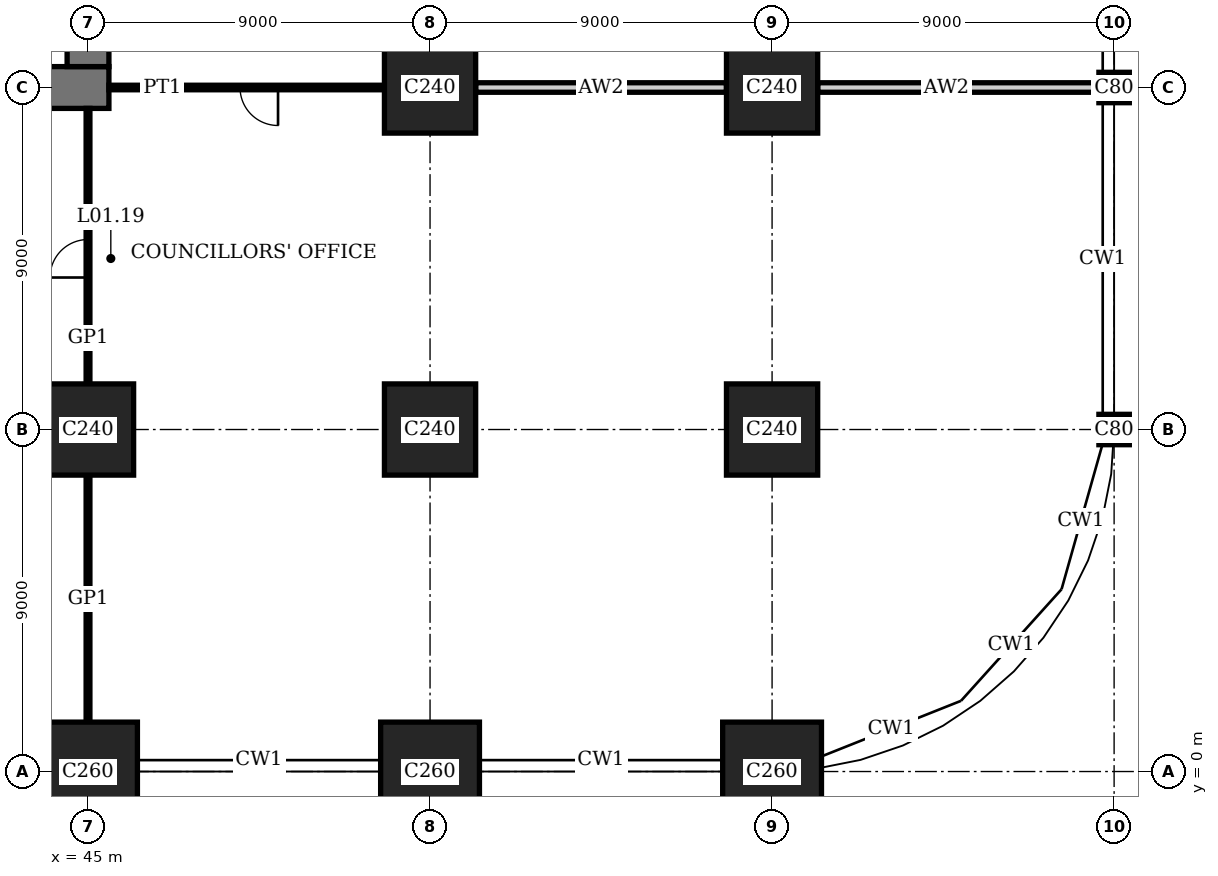
"""IFC4 building model, lengths in metres.
Left out: names, types, materials, properties, quantities, classifications, styles, units other than length and angle.
Written with IfcOpenShell. Run it as: python <this file> out.ifc"""

import sys

from ifc_helpers import new_model, si_unit, direction, frame, frame_2d, origin, origin_2d, place, context, subcontext, project, spatial, rectangle, extrude, element, fill, save


model = new_model("IFC4")
c1 = context("Model", 3, precision=1e-05, world=origin(), true_north=direction((0.0, 1.0)))
c2 = subcontext(c1, "Body", "Model", "MODEL_VIEW")
j1 = project(units=[si_unit("LENGTHUNIT", "METRE"), si_unit("PLANEANGLEUNIT", "RADIAN")], contexts=[c1])
p1 = place(None, origin())
s1 = spatial("IfcSite", under=j1, at=p1, CompositionType="ELEMENT")
p2 = place(p1, origin())
s2 = spatial("IfcBuilding", under=s1, at=p2, CompositionType="ELEMENT")
p3 = place(p2, frame((0.0, 0.0, 5.4)))
s3 = spatial("IfcBuildingStorey", under=s2, at=p3, CompositionType="ELEMENT", Elevation=5.4)
p4 = place(p3, frame((45.0, 0.0, 0.0), z_axis=(0.0, 0.0, 1.0), x_axis=(1.0, 0.0, 0.0)))
e1 = element("IfcColumn", 1, at=p4, inside=s3, PredefinedType="COLUMN", context=c2, shape_type="SweptSolid", body=[
    extrude(rectangle(XDim=2.6, YDim=2.6, at=origin_2d()), origin(), (0.0, 0.0, 1.0), 5.4),
])
p5 = place(p3, frame((45.0, 9.0, 0.0), z_axis=(0.0, 0.0, 1.0), x_axis=(1.0, 0.0, 0.0)))
e2 = element("IfcColumn", 2, at=p5, inside=s3, PredefinedType="COLUMN", context=c2, shape_type="SweptSolid", body=[
    extrude(rectangle(XDim=2.4, YDim=2.4, at=origin_2d()), origin(), (0.0, 0.0, 1.0), 5.4),
])
p6 = place(p3, frame((54.0, 0.0, 0.0), z_axis=(0.0, 0.0, 1.0), x_axis=(1.0, 0.0, 0.0)))
e3 = element("IfcColumn", 3, at=p6, inside=s3, PredefinedType="COLUMN", context=c2, shape_type="SweptSolid", body=[
    extrude(rectangle(XDim=2.6, YDim=2.6, at=origin_2d()), origin(), (0.0, 0.0, 1.0), 5.4),
])
for number, where, z_axis, x_axis in (
    (4, (54.0, 9.0, 0.0), (0.0, 0.0, 1.0), (1.0, 0.0, 0.0)),
    (5, (54.0, 18.0, 0.0), (0.0, 0.0, 1.0), (1.0, 0.0, 0.0)),
):
    element("IfcColumn", number, at=place(p3, frame(where, z_axis=z_axis, x_axis=x_axis)), inside=s3, PredefinedType="COLUMN", context=c2, shape_type="SweptSolid", body=[
        extrude(rectangle(XDim=2.4, YDim=2.4, at=origin_2d()), origin(), (0.0, 0.0, 1.0), 5.4),
    ])
p7 = place(p3, frame((63.0, 0.0, 0.0), z_axis=(0.0, 0.0, 1.0), x_axis=(1.0, 0.0, 0.0)))
e6 = element("IfcColumn", 6, at=p7, inside=s3, PredefinedType="COLUMN", context=c2, shape_type="SweptSolid", body=[
    extrude(rectangle(XDim=2.6, YDim=2.6, at=origin_2d()), origin(), (0.0, 0.0, 1.0), 5.4),
])
for number, where, z_axis, x_axis in (
    (7, (63.0, 9.0, 0.0), (0.0, 0.0, 1.0), (1.0, 0.0, 0.0)),
    (8, (63.0, 18.0, 0.0), (0.0, 0.0, 1.0), (1.0, 0.0, 0.0)),
):
    element("IfcColumn", number, at=place(p3, frame(where, z_axis=z_axis, x_axis=x_axis)), inside=s3, PredefinedType="COLUMN", context=c2, shape_type="SweptSolid", body=[
        extrude(rectangle(XDim=2.4, YDim=2.4, at=origin_2d()), origin(), (0.0, 0.0, 1.0), 5.4),
    ])
for number, where, z_axis, x_axis in (
    (9, (72.0, 9.0, 0.0), (0.0, 0.0, 1.0), (1.0, 0.0, 0.0)),
    (10, (72.0, 18.0, 0.0), (0.0, 0.0, 1.0), (1.0, 0.0, 0.0)),
):
    element("IfcColumn", number, at=place(p3, frame(where, z_axis=z_axis, x_axis=x_axis)), inside=s3, PredefinedType="COLUMN", context=c2, shape_type="SweptSolid", body=[
        extrude(rectangle(XDim=0.8, YDim=0.8, at=origin_2d()), origin(), (0.0, 0.0, 1.0), 5.4),
    ])
p8 = place(p3, frame((17.45, 18.0, 0.0), z_axis=(0.0, 0.0, 1.0), x_axis=(1.0, 0.0, 0.0)))
e11 = element("IfcWall", 11, at=p8, inside=s3, PredefinedType="SHEAR", context=c2, shape_type="SweptSolid", body=[
    extrude(rectangle(XDim=28.1, YDim=1.1, at=frame_2d((14.05, 0.0))), origin(), (0.0, 0.0, 1.0), 5.4),
])
p9 = place(p8, frame((11.55, 0.0, 0.0)))
e12 = element("IfcOpeningElement", 12, at=p9, cuts=e11, PredefinedType="OPENING", context=c2, shape_type="SweptSolid", body=[
    extrude(rectangle(XDim=1.0, YDim=2.4, at=frame_2d((0.5, 1.2))), frame((0.0, 0.56, 0.0), z_axis=(0.0, -1.0, 0.0), x_axis=(1.0, 0.0, 0.0)), (0.0, 0.0, 1.0), 1.12),
])
p10 = place(p8, frame((16.55, 0.0, 0.0)))
e13 = element("IfcOpeningElement", 13, at=p10, cuts=e11, PredefinedType="OPENING", context=c2, shape_type="SweptSolid", body=[
    extrude(rectangle(XDim=1.0, YDim=2.4, at=frame_2d((0.5, 1.2))), frame((0.0, 0.56, 0.0), z_axis=(0.0, -1.0, 0.0), x_axis=(1.0, 0.0, 0.0)), (0.0, 0.0, 1.0), 1.12),
])
p11 = place(p8, frame((20.0, 0.0, 0.0)))
e14 = element("IfcOpeningElement", 14, at=p11, cuts=e11, PredefinedType="OPENING", context=c2, shape_type="SweptSolid", body=[
    extrude(rectangle(XDim=1.1, YDim=2.4, at=frame_2d((0.55, 1.2))), frame((0.0, 0.56, 0.0), z_axis=(0.0, -1.0, 0.0), x_axis=(1.0, 0.0, 0.0)), (0.0, 0.0, 1.0), 1.12),
])
p12 = place(p8, frame((24.05, 0.0, 0.0)))
e15 = element("IfcOpeningElement", 15, at=p12, cuts=e11, PredefinedType="OPENING", context=c2, shape_type="SweptSolid", body=[
    extrude(rectangle(XDim=1.0, YDim=2.4, at=frame_2d((0.5, 1.2))), frame((0.0, 0.56, 0.0), z_axis=(0.0, -1.0, 0.0), x_axis=(1.0, 0.0, 0.0)), (0.0, 0.0, 1.0), 1.12),
])
p13 = place(p3, frame((45.0, 18.55, 0.0), z_axis=(0.0, 0.0, 1.0), x_axis=(0.0, 1.0, 0.0)))
e16 = element("IfcWall", 16, at=p13, inside=s3, PredefinedType="SHEAR", context=c2, shape_type="SweptSolid", body=[
    extrude(rectangle(XDim=16.9, YDim=1.1, at=frame_2d((8.45, 0.0))), origin(), (0.0, 0.0, 1.0), 5.4),
])
p14 = place(p13, frame((8.45, 0.0, 0.0)))
e17 = element("IfcOpeningElement", 17, at=p14, cuts=e16, PredefinedType="OPENING", context=c2, shape_type="SweptSolid", body=[
    extrude(rectangle(XDim=1.8, YDim=2.4, at=frame_2d((0.9, 1.2))), frame((0.0, 0.56, 0.0), z_axis=(0.0, -1.0, 0.0), x_axis=(1.0, 0.0, 0.0)), (0.0, 0.0, 1.0), 1.12),
])
p15 = place(p3, frame((55.2, 18.0, 0.0), z_axis=(0.0, 0.0, 1.0), x_axis=(1.0, 0.0, 0.0)))
e18 = element("IfcWall", 18, at=p15, inside=s3, PredefinedType="PARTITIONING", context=c2, shape_type="SweptSolid", body=[
    extrude(rectangle(XDim=6.6, YDim=0.25, at=frame_2d((3.3, 0.0))), origin(), (0.0, 0.0, 1.0), 4.3),
])
p16 = place(p3, frame((64.2, 18.0, 0.0), z_axis=(0.0, 0.0, 1.0), x_axis=(1.0, 0.0, 0.0)))
e19 = element("IfcWall", 19, at=p16, inside=s3, PredefinedType="PARTITIONING", context=c2, shape_type="SweptSolid", body=[
    extrude(rectangle(XDim=7.4, YDim=0.25, at=frame_2d((3.7, 0.0))), origin(), (0.0, 0.0, 1.0), 4.3),
])
p17 = place(p3, frame((45.0, 1.3, 0.0), z_axis=(0.0, 0.0, 1.0), x_axis=(0.0, 1.0, 0.0)))
e20 = element("IfcWall", 20, at=p17, inside=s3, PredefinedType="PARTITIONING", context=c2, shape_type="SweptSolid", body=[
    extrude(rectangle(XDim=6.5, YDim=0.1, at=frame_2d((3.25, 0.0))), origin(), (0.0, 0.0, 1.0), 4.3),
])
p18 = place(p3, frame((45.0, 10.2, 0.0), z_axis=(0.0, 0.0, 1.0), x_axis=(0.0, 1.0, 0.0)))
e21 = element("IfcWall", 21, at=p18, inside=s3, PredefinedType="PARTITIONING", context=c2, shape_type="SweptSolid", body=[
    extrude(rectangle(XDim=7.25, YDim=0.1, at=frame_2d((3.625, 0.0))), origin(), (0.0, 0.0, 1.0), 4.3),
])
p19 = place(p18, frame((2.8, 0.0, 0.0)))
e22 = element("IfcOpeningElement", 22, at=p19, cuts=e21, PredefinedType="OPENING", context=c2, shape_type="SweptSolid", body=[
    extrude(rectangle(XDim=1.0, YDim=2.4, at=frame_2d((0.5, 1.2))), frame((0.0, 0.06, 0.0), z_axis=(0.0, -1.0, 0.0), x_axis=(1.0, 0.0, 0.0)), (0.0, 0.0, 1.0), 0.12),
])
p20 = place(p3, frame((45.55, 18.0, 0.0), z_axis=(0.0, 0.0, 1.0), x_axis=(1.0, 0.0, 0.0)))
e23 = element("IfcWall", 23, at=p20, inside=s3, PredefinedType="PARTITIONING", context=c2, shape_type="SweptSolid", body=[
    extrude(rectangle(XDim=7.25, YDim=0.12, at=frame_2d((3.625, 0.0))), origin(), (0.0, 0.0, 1.0), 4.3),
])
p21 = place(p20, frame((3.45, 0.0, 0.0)))
e24 = element("IfcOpeningElement", 24, at=p21, cuts=e23, PredefinedType="OPENING", context=c2, shape_type="SweptSolid", body=[
    extrude(rectangle(XDim=1.0, YDim=2.4, at=frame_2d((0.5, 1.2))), frame((0.0, 0.07, 0.0), z_axis=(0.0, -1.0, 0.0), x_axis=(1.0, 0.0, 0.0)), (0.0, 0.0, 1.0), 0.14),
])
p22 = place(p19, origin())
e25 = element("IfcDoor", 25, at=p22, inside=s3, OperationType="SINGLE_SWING_RIGHT", PredefinedType="DOOR", context=c2, shape_type="SweptSolid", body=[
    extrude(rectangle(XDim=1.0, YDim=2.4, at=frame_2d((0.5, 1.2))), frame((0.0, 0.02, 0.0), z_axis=(0.0, -1.0, 0.0), x_axis=(1.0, 0.0, 0.0)), (0.0, 0.0, 1.0), 0.04),
])
fill(e22, e25)
p23 = place(p21, origin())
e26 = element("IfcDoor", 26, at=p23, inside=s3, OperationType="SINGLE_SWING_RIGHT", PredefinedType="DOOR", context=c2, shape_type="SweptSolid", body=[
    extrude(rectangle(XDim=1.0, YDim=2.4, at=frame_2d((0.5, 1.2))), frame((0.0, 0.025, 0.0), z_axis=(0.0, -1.0, 0.0), x_axis=(1.0, 0.0, 0.0)), (0.0, 0.0, 1.0), 0.05),
])
fill(e24, e26)
save(model, sys.argv[1])
